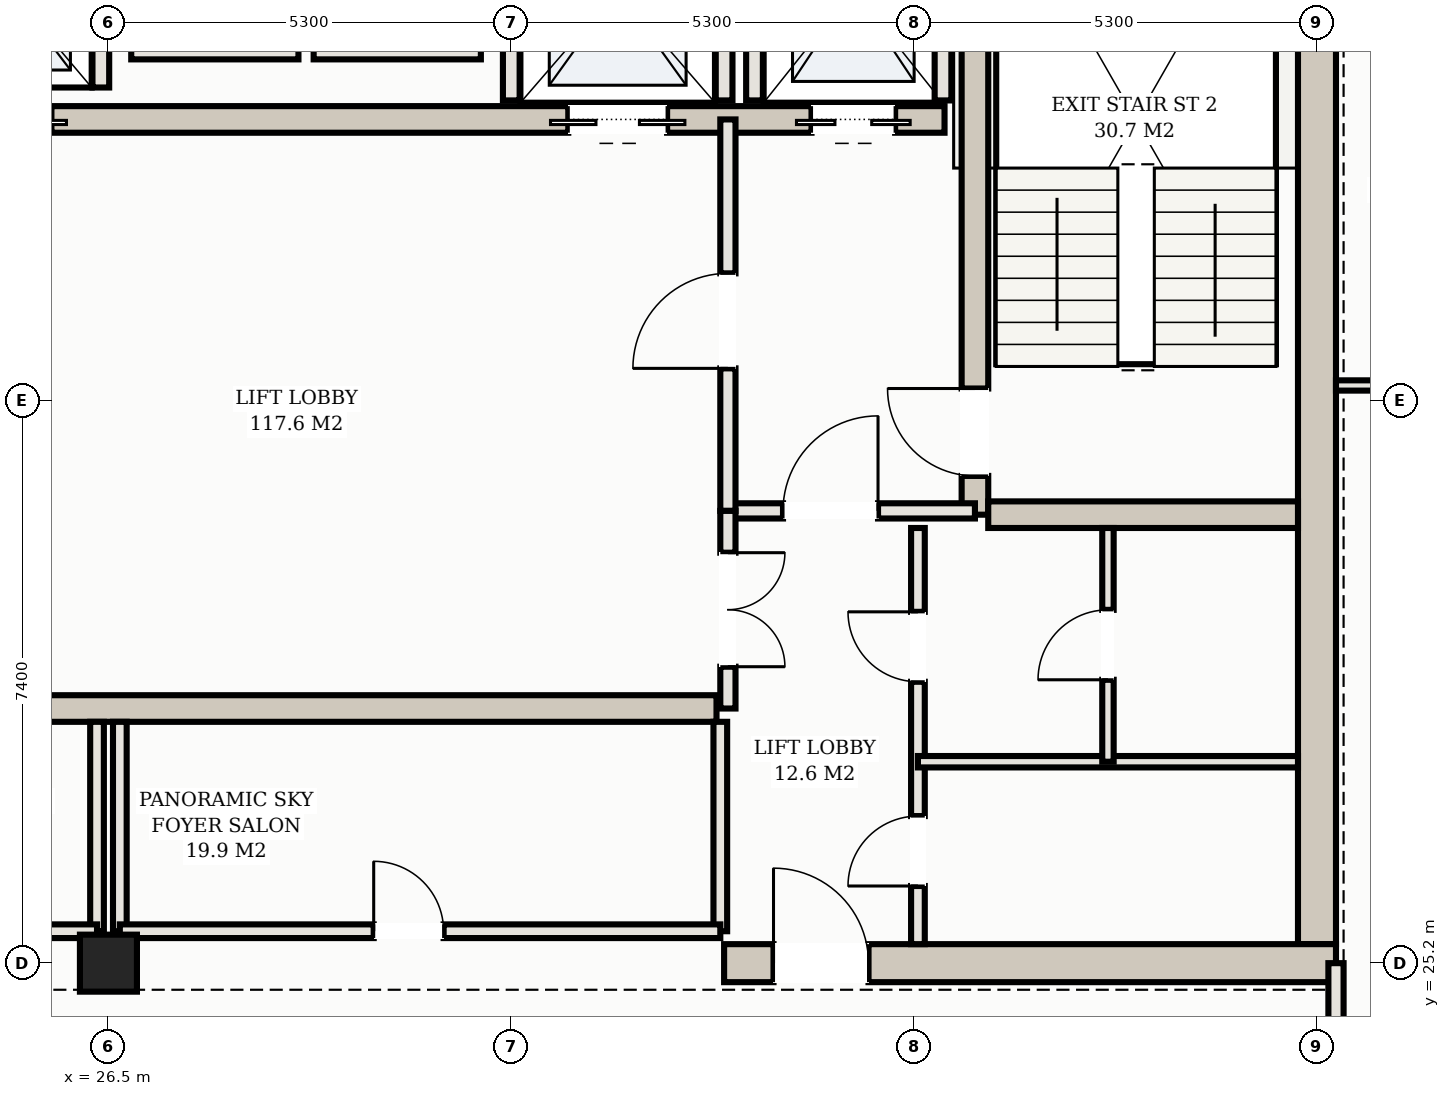
"""IFC4 building model, lengths in metres.
Left out: names, types, materials, properties, quantities, classifications, styles, units other than length and angle.
Written with IfcOpenShell. Run it as: python <this file> out.ifc"""

import sys

from ifc_helpers import new_model, si_unit, direction, frame, frame_2d, origin, origin_2d, place, context, subcontext, project, spatial, rectangle, hollow_rectangle, extrude, element, fill, save


model = new_model("IFC4")
c1 = context("Model", 3, precision=1e-05, world=origin(), true_north=direction((0.0, 1.0)))
c2 = subcontext(c1, "Body", "Model", "MODEL_VIEW")
j1 = project(units=[si_unit("LENGTHUNIT", "METRE"), si_unit("PLANEANGLEUNIT", "RADIAN")], contexts=[c1])
p1 = place(None, origin())
s1 = spatial("IfcSite", under=j1, at=p1, CompositionType="ELEMENT")
p2 = place(p1, origin())
s2 = spatial("IfcBuilding", under=s1, at=p2, CompositionType="ELEMENT")
p3 = place(p2, frame((0.0, 0.0, 226.4)))
s3 = spatial("IfcBuildingStorey", under=s2, at=p3, CompositionType="ELEMENT", Elevation=226.4)
p4 = place(p3, frame((42.4, 25.45, 0.0), z_axis=(0.0, 0.0, 1.0), x_axis=(0.0, 1.0, 0.0)))
e1 = element("IfcWall", 1, at=p4, inside=s3, PredefinedType="SHEAR", context=c2, shape_type="SweptSolid", body=[
    extrude(rectangle(XDim=14.3, YDim=0.5, at=frame_2d((7.15, 0.0))), origin(), (0.0, 0.0, 1.0), 3.11),
])
p5 = place(p3, frame((34.6, 25.2, 0.0), z_axis=(0.0, 0.0, 1.0), x_axis=(1.0, 0.0, 0.0)))
e2 = element("IfcWall", 2, at=p5, inside=s3, PredefinedType="SHEAR", context=c2, shape_type="SweptSolid", body=[
    extrude(rectangle(XDim=8.05, YDim=0.5, at=frame_2d((4.025, 0.0))), origin(), (0.0, 0.0, 1.0), 3.11),
])
p6 = place(p5, frame((0.65, 0.0, 0.0)))
e3 = element("IfcOpeningElement", 3, at=p6, cuts=e2, PredefinedType="OPENING", context=c2, shape_type="SweptSolid", body=[
    extrude(rectangle(XDim=1.25, YDim=2.2, at=frame_2d((0.625, 1.1))), frame((0.0, 0.26, 0.0), z_axis=(0.0, -1.0, 0.0), x_axis=(1.0, 0.0, 0.0)), (0.0, 0.0, 1.0), 0.52),
])
p7 = place(p3, frame((37.9, 31.1, 0.0), z_axis=(0.0, 0.0, 1.0), x_axis=(0.0, 1.0, 0.0)))
e4 = element("IfcWall", 4, at=p7, inside=s3, PredefinedType="SHEAR", context=c2, shape_type="SweptSolid", body=[
    extrude(rectangle(XDim=8.65, YDim=0.35, at=frame_2d((4.325, 0.0))), origin(), (0.0, 0.0, 1.0), 3.11),
])
p8 = place(p7, frame((0.51, 0.0, 0.0)))
e5 = element("IfcOpeningElement", 5, at=p8, cuts=e4, PredefinedType="OPENING", context=c2, shape_type="SweptSolid", body=[
    extrude(rectangle(XDim=1.15, YDim=2.2, at=frame_2d((0.575, 1.1))), frame((0.0, 0.185, 0.0), z_axis=(0.0, -1.0, 0.0), x_axis=(1.0, 0.0, 0.0)), (0.0, 0.0, 1.0), 0.37),
])
p9 = place(p3, frame((38.075, 31.1, 0.0), z_axis=(0.0, 0.0, 1.0), x_axis=(1.0, 0.0, 0.0)))
e6 = element("IfcWall", 6, at=p9, inside=s3, PredefinedType="SHEAR", context=c2, shape_type="SweptSolid", body=[
    extrude(rectangle(XDim=4.075, YDim=0.35, at=frame_2d((2.038, 0.0))), origin(), (0.0, 0.0, 1.0), 3.11),
])
p10 = place(p3, frame((15.5, 36.3, 0.0), z_axis=(0.0, 0.0, 1.0), x_axis=(1.0, 0.0, 0.0)))
e7 = element("IfcWall", 7, at=p10, inside=s3, PredefinedType="SHEAR", context=c2, shape_type="SweptSolid", body=[
    extrude(rectangle(XDim=22.0, YDim=0.35, at=frame_2d((11.0, 0.0))), origin(), (0.0, 0.0, 1.0), 3.11),
])
p11 = place(p10, frame((0.65, 0.0, 0.0)))
e8 = element("IfcOpeningElement", 8, at=p11, cuts=e7, PredefinedType="OPENING", context=c2, shape_type="SweptSolid", body=[
    extrude(rectangle(XDim=1.1, YDim=2.15, at=frame_2d((0.55, 1.075))), frame((0.0, 0.185, 0.0), z_axis=(0.0, -1.0, 0.0), x_axis=(1.0, 0.0, 0.0)), (0.0, 0.0, 1.0), 0.37),
])
p12 = place(p10, frame((20.25, 0.0, 0.0)))
e9 = element("IfcOpeningElement", 9, at=p12, cuts=e7, PredefinedType="OPENING", context=c2, shape_type="SweptSolid", body=[
    extrude(rectangle(XDim=1.1, YDim=2.15, at=frame_2d((0.55, 1.075))), frame((0.0, 0.185, 0.0), z_axis=(0.0, -1.0, 0.0), x_axis=(1.0, 0.0, 0.0)), (0.0, 0.0, 1.0), 0.37),
])
p13 = place(p10, frame((17.05, 0.0, 0.0)))
e10 = element("IfcOpeningElement", 10, at=p13, cuts=e7, PredefinedType="OPENING", context=c2, shape_type="SweptSolid", body=[
    extrude(rectangle(XDim=1.3, YDim=2.2, at=frame_2d((0.65, 1.1))), frame((0.0, 0.185, 0.0), z_axis=(0.0, -1.0, 0.0), x_axis=(1.0, 0.0, 0.0)), (0.0, 0.0, 1.0), 0.37),
])
p14 = place(p10, frame((3.95, 0.0, 0.0)))
e11 = element("IfcOpeningElement", 11, at=p14, cuts=e7, PredefinedType="OPENING", context=c2, shape_type="SweptSolid", body=[
    extrude(rectangle(XDim=1.1, YDim=2.15, at=frame_2d((0.55, 1.075))), frame((0.0, 0.185, 0.0), z_axis=(0.0, -1.0, 0.0), x_axis=(1.0, 0.0, 0.0)), (0.0, 0.0, 1.0), 0.37),
])
p15 = place(p10, frame((6.55, 0.0, 0.0)))
e12 = element("IfcOpeningElement", 12, at=p15, cuts=e7, PredefinedType="OPENING", context=c2, shape_type="SweptSolid", body=[
    extrude(rectangle(XDim=1.1, YDim=2.15, at=frame_2d((0.55, 1.075))), frame((0.0, 0.185, 0.0), z_axis=(0.0, -1.0, 0.0), x_axis=(1.0, 0.0, 0.0)), (0.0, 0.0, 1.0), 0.37),
])
p16 = place(p10, frame((9.15, 0.0, 0.0)))
e13 = element("IfcOpeningElement", 13, at=p16, cuts=e7, PredefinedType="OPENING", context=c2, shape_type="SweptSolid", body=[
    extrude(rectangle(XDim=1.1, YDim=2.15, at=frame_2d((0.55, 1.075))), frame((0.0, 0.185, 0.0), z_axis=(0.0, -1.0, 0.0), x_axis=(1.0, 0.0, 0.0)), (0.0, 0.0, 1.0), 0.37),
])
p17 = place(p3, frame((18.5, 28.55, 0.0), z_axis=(0.0, 0.0, 1.0), x_axis=(1.0, 0.0, 0.0)))
e14 = element("IfcWall", 14, at=p17, inside=s3, PredefinedType="SHEAR", context=c2, shape_type="SweptSolid", body=[
    extrude(rectangle(XDim=16.0, YDim=0.35, at=frame_2d((8.0, 0.0))), origin(), (0.0, 0.0, 1.0), 3.11),
])
p18 = place(p3, frame((26.5, 25.2, 0.0), z_axis=(0.0, 0.0, 1.0), x_axis=(1.0, 0.0, 0.0)))
e15 = element("IfcColumn", 15, at=p18, inside=s3, PredefinedType="COLUMN", context=c2, shape_type="SweptSolid", body=[
    extrude(hollow_rectangle(XDim=0.75, YDim=0.75, WallThickness=0.025, at=origin_2d()), origin(), (0.0, 0.0, 1.0), 3.3),
])
for number, where, z_axis, x_axis in (
    (16, (35.0, 36.55, 0.0), (0.0, 0.0, 1.0), (0.0, 1.0, 0.0)),
    (17, (37.48, 36.55, 0.0), (0.0, 0.0, 1.0), (0.0, 1.0, 0.0)),
    (18, (31.8, 36.55, 0.0), (0.0, 0.0, 1.0), (0.0, 1.0, 0.0)),
    (19, (34.6, 36.55, 0.0), (0.0, 0.0, 1.0), (0.0, 1.0, 0.0)),
):
    element("IfcWall", number, at=place(p3, frame(where, z_axis=z_axis, x_axis=x_axis)), inside=s3, PredefinedType="SOLIDWALL", context=c2, shape_type="SweptSolid", body=[
        extrude(rectangle(XDim=2.93, YDim=0.22, at=frame_2d((1.465, 0.0))), origin(), (0.0, 0.0, 1.0), 3.11),
    ])
p19 = place(p3, frame((26.4, 36.72, 0.0), z_axis=(0.0, 0.0, 1.0), x_axis=(0.0, 1.0, 0.0)))
e20 = element("IfcWall", 20, at=p19, inside=s3, PredefinedType="SOLIDWALL", context=c2, shape_type="SweptSolid", body=[
    extrude(rectangle(XDim=2.56, YDim=0.22, at=frame_2d((1.28, 0.0))), origin(), (0.0, 0.0, 1.0), 3.11),
])
for number, where, z_axis, x_axis in (
    (21, (26.8, 37.2, 0.0), (0.0, 0.0, 1.0), (1.0, 0.0, 0.0)),
    (22, (29.2, 37.2, 0.0), (0.0, 0.0, 1.0), (1.0, 0.0, 0.0)),
):
    element("IfcWall", number, at=place(p3, frame(where, z_axis=z_axis, x_axis=x_axis)), inside=s3, PredefinedType="SOLIDWALL", context=c2, shape_type="SweptSolid", body=[
        extrude(rectangle(XDim=2.2, YDim=0.22, at=frame_2d((1.1, 0.0))), origin(), (0.0, 0.0, 1.0), 3.11),
    ])
p20 = place(p3, frame((34.65, 31.15, 0.0), z_axis=(0.0, 0.0, 1.0), x_axis=(1.0, 0.0, 0.0)))
e23 = element("IfcWall", 23, at=p20, inside=s3, PredefinedType="PARTITIONING", context=c2, shape_type="SweptSolid", body=[
    extrude(rectangle(XDim=3.25, YDim=0.2, at=frame_2d((1.625, 0.0))), origin(), (0.0, 0.0, 1.0), 2.43),
])
p21 = place(p20, frame((0.725, 0.0, 0.0)))
e24 = element("IfcOpeningElement", 24, at=p21, cuts=e23, PredefinedType="OPENING", context=c2, shape_type="SweptSolid", body=[
    extrude(rectangle(XDim=1.25, YDim=2.2, at=frame_2d((0.625, 1.1))), frame((0.0, 0.11, 0.0), z_axis=(0.0, -1.0, 0.0), x_axis=(1.0, 0.0, 0.0)), (0.0, 0.0, 1.0), 0.22),
])
p22 = place(p3, frame((34.65, 31.15, 0.0), z_axis=(0.0, 0.0, 1.0), x_axis=(0.0, 1.0, 0.0)))
e25 = element("IfcWall", 25, at=p22, inside=s3, PredefinedType="PARTITIONING", context=c2, shape_type="SweptSolid", body=[
    extrude(rectangle(XDim=5.15, YDim=0.2, at=frame_2d((2.575, 0.0))), origin(), (0.0, 0.0, 1.0), 2.43),
])
p23 = place(p22, frame((1.875, 0.0, 0.0)))
e26 = element("IfcOpeningElement", 26, at=p23, cuts=e25, PredefinedType="OPENING", context=c2, shape_type="SweptSolid", body=[
    extrude(rectangle(XDim=1.25, YDim=2.2, at=frame_2d((0.625, 1.1))), frame((0.0, 0.11, 0.0), z_axis=(0.0, -1.0, 0.0), x_axis=(1.0, 0.0, 0.0)), (0.0, 0.0, 1.0), 0.22),
])
p24 = place(p3, frame((37.15, 25.45, 0.0), z_axis=(0.0, 0.0, 1.0), x_axis=(0.0, 1.0, 0.0)))
e27 = element("IfcWall", 27, at=p24, inside=s3, PredefinedType="PARTITIONING", context=c2, shape_type="SweptSolid", body=[
    extrude(rectangle(XDim=5.475, YDim=0.18, at=frame_2d((2.738, 0.0))), origin(), (0.0, 0.0, 1.0), 2.43),
])
p25 = place(p24, frame((0.765, 0.0, 0.0)))
e28 = element("IfcOpeningElement", 28, at=p25, cuts=e27, PredefinedType="OPENING", context=c2, shape_type="SweptSolid", body=[
    extrude(rectangle(XDim=0.92, YDim=2.15, at=frame_2d((0.46, 1.075))), frame((0.0, 0.1, 0.0), z_axis=(0.0, -1.0, 0.0), x_axis=(1.0, 0.0, 0.0)), (0.0, 0.0, 1.0), 0.2),
])
p26 = place(p24, frame((3.452, 0.0, 0.0)))
e29 = element("IfcOpeningElement", 29, at=p26, cuts=e27, PredefinedType="OPENING", context=c2, shape_type="SweptSolid", body=[
    extrude(rectangle(XDim=0.92, YDim=2.15, at=frame_2d((0.46, 1.075))), frame((0.0, 0.1, 0.0), z_axis=(0.0, -1.0, 0.0), x_axis=(1.0, 0.0, 0.0)), (0.0, 0.0, 1.0), 0.2),
])
p27 = place(p3, frame((37.15, 27.85, 0.0), z_axis=(0.0, 0.0, 1.0), x_axis=(1.0, 0.0, 0.0)))
e30 = element("IfcWall", 30, at=p27, inside=s3, PredefinedType="PARTITIONING", context=c2, shape_type="SweptSolid", body=[
    extrude(rectangle(XDim=5.0, YDim=0.15, at=frame_2d((2.5, 0.0))), origin(), (0.0, 0.0, 1.0), 2.43),
])
p28 = place(p3, frame((39.65, 27.85, 0.0), z_axis=(0.0, 0.0, 1.0), x_axis=(0.0, 1.0, 0.0)))
e31 = element("IfcWall", 31, at=p28, inside=s3, PredefinedType="PARTITIONING", context=c2, shape_type="SweptSolid", body=[
    extrude(rectangle(XDim=3.075, YDim=0.15, at=frame_2d((1.538, 0.0))), origin(), (0.0, 0.0, 1.0), 2.43),
])
p29 = place(p28, frame((1.078, 0.0, 0.0)))
e32 = element("IfcOpeningElement", 32, at=p29, cuts=e31, PredefinedType="OPENING", context=c2, shape_type="SweptSolid", body=[
    extrude(rectangle(XDim=0.92, YDim=2.15, at=frame_2d((0.46, 1.075))), frame((0.0, 0.085, 0.0), z_axis=(0.0, -1.0, 0.0), x_axis=(1.0, 0.0, 0.0)), (0.0, 0.0, 1.0), 0.17),
])
p30 = place(p3, frame((34.65, 28.55, 0.0), z_axis=(0.0, 0.0, 1.0), x_axis=(0.0, 1.0, 0.0)))
e33 = element("IfcWall", 33, at=p30, inside=s3, PredefinedType="PARTITIONING", context=c2, shape_type="SweptSolid", body=[
    extrude(rectangle(XDim=2.6, YDim=0.2, at=frame_2d((1.3, 0.0))), origin(), (0.0, 0.0, 1.0), 2.43),
])
p31 = place(p30, frame((0.55, 0.0, 0.0)))
e34 = element("IfcOpeningElement", 34, at=p31, cuts=e33, PredefinedType="OPENING", context=c2, shape_type="SweptSolid", body=[
    extrude(rectangle(XDim=1.5, YDim=2.25, at=frame_2d((0.75, 1.125))), frame((0.0, 0.11, 0.0), z_axis=(0.0, -1.0, 0.0), x_axis=(1.0, 0.0, 0.0)), (0.0, 0.0, 1.0), 0.22),
])
p32 = place(p3, frame((26.35, 25.62, 0.0), z_axis=(0.0, 0.0, 1.0), x_axis=(0.0, 1.0, 0.0)))
e35 = element("IfcWall", 35, at=p32, inside=s3, PredefinedType="PARTITIONING", context=c2, shape_type="SweptSolid", body=[
    extrude(rectangle(XDim=2.755, YDim=0.18, at=frame_2d((1.377, 0.0))), origin(), (0.0, 0.0, 1.0), 2.43),
])
p33 = place(p3, frame((18.45, 25.62, 0.0), z_axis=(0.0, 0.0, 1.0), x_axis=(1.0, 0.0, 0.0)))
e36 = element("IfcWall", 36, at=p33, inside=s3, PredefinedType="PARTITIONING", context=c2, shape_type="SweptSolid", body=[
    extrude(rectangle(XDim=7.9, YDim=0.18, at=frame_2d((3.95, 0.0))), origin(), (0.0, 0.0, 1.0), 2.43),
])
p34 = place(p33, frame((3.34, 0.0, 0.0)))
e37 = element("IfcOpeningElement", 37, at=p34, cuts=e36, PredefinedType="OPENING", context=c2, shape_type="SweptSolid", body=[
    extrude(rectangle(XDim=0.92, YDim=2.15, at=frame_2d((0.46, 1.075))), frame((0.0, 0.1, 0.0), z_axis=(0.0, -1.0, 0.0), x_axis=(1.0, 0.0, 0.0)), (0.0, 0.0, 1.0), 0.2),
])
for number, where, z_axis, x_axis in (
    (38, (26.65, 25.62, 0.0), (0.0, 0.0, 1.0), (0.0, 1.0, 0.0)),
    (39, (34.55, 25.62, 0.0), (0.0, 0.0, 1.0), (0.0, 1.0, 0.0)),
):
    element("IfcWall", number, at=place(p3, frame(where, z_axis=z_axis, x_axis=x_axis)), inside=s3, PredefinedType="PARTITIONING", context=c2, shape_type="SweptSolid", body=[
        extrude(rectangle(XDim=2.755, YDim=0.18, at=frame_2d((1.377, 0.0))), origin(), (0.0, 0.0, 1.0), 2.43),
    ])
p35 = place(p3, frame((26.65, 25.62, 0.0), z_axis=(0.0, 0.0, 1.0), x_axis=(1.0, 0.0, 0.0)))
e40 = element("IfcWall", 40, at=p35, inside=s3, PredefinedType="PARTITIONING", context=c2, shape_type="SweptSolid", body=[
    extrude(rectangle(XDim=7.9, YDim=0.18, at=frame_2d((3.95, 0.0))), origin(), (0.0, 0.0, 1.0), 2.43),
])
p36 = place(p35, frame((3.34, 0.0, 0.0)))
e41 = element("IfcOpeningElement", 41, at=p36, cuts=e40, PredefinedType="OPENING", context=c2, shape_type="SweptSolid", body=[
    extrude(rectangle(XDim=0.92, YDim=2.15, at=frame_2d((0.46, 1.075))), frame((0.0, 0.1, 0.0), z_axis=(0.0, -1.0, 0.0), x_axis=(1.0, 0.0, 0.0)), (0.0, 0.0, 1.0), 0.2),
])
p37 = place(p3, frame((42.65, 23.75, 0.0), z_axis=(0.0, 0.0, 1.0), x_axis=(0.0, 1.0, 0.0)))
e42 = element("IfcWall", 42, at=p37, inside=s3, PredefinedType="PARTITIONING", context=c2, shape_type="SweptSolid", body=[
    extrude(rectangle(XDim=1.45, YDim=0.2, at=frame_2d((0.725, 0.0))), origin(), (0.0, 0.0, 1.0), 2.43),
])
p38 = place(p3, frame((42.65, 32.8, 0.0), z_axis=(0.0, 0.0, 1.0), x_axis=(1.0, 0.0, 0.0)))
e43 = element("IfcWall", 43, at=p38, inside=s3, PredefinedType="PARTITIONING", context=c2, shape_type="SweptSolid", body=[
    extrude(rectangle(XDim=3.63, YDim=0.135, at=frame_2d((1.815, 0.0))), origin(), (0.0, 0.0, 1.0), 2.43),
])
p39 = place(p38, frame((1.355, 0.0, 0.0)))
e44 = element("IfcOpeningElement", 44, at=p39, cuts=e43, PredefinedType="OPENING", context=c2, shape_type="SweptSolid", body=[
    extrude(rectangle(XDim=0.92, YDim=2.15, at=frame_2d((0.46, 1.075))), frame((0.0, 0.078, 0.0), z_axis=(0.0, -1.0, 0.0), x_axis=(1.0, 0.0, 0.0)), (0.0, 0.0, 1.0), 0.155),
])
p40 = place(p12, frame((1.1, 0.0, 0.0), z_axis=(0.0, 0.0, 1.0), x_axis=(-1.0, 0.0, 0.0)))
e45 = element("IfcDoor", 45, at=p40, inside=s3, OperationType="DOUBLE_DOOR_SLIDING", PredefinedType="DOOR", context=c2, shape_type="SweptSolid", body=[
    extrude(rectangle(XDim=1.1, YDim=2.15, at=frame_2d((0.55, 1.075))), frame((0.0, 0.025, 0.0), z_axis=(0.0, -1.0, 0.0), x_axis=(1.0, 0.0, 0.0)), (0.0, 0.0, 1.0), 0.05),
])
fill(e9, e45)
p41 = place(p13, frame((1.3, 0.0, 0.0), z_axis=(0.0, 0.0, 1.0), x_axis=(-1.0, 0.0, 0.0)))
e46 = element("IfcDoor", 46, at=p41, inside=s3, OperationType="DOUBLE_DOOR_SLIDING", PredefinedType="DOOR", context=c2, shape_type="SweptSolid", body=[
    extrude(rectangle(XDim=1.3, YDim=2.2, at=frame_2d((0.65, 1.1))), frame((0.0, 0.025, 0.0), z_axis=(0.0, -1.0, 0.0), x_axis=(1.0, 0.0, 0.0)), (0.0, 0.0, 1.0), 0.05),
])
fill(e10, e46)
p42 = place(p6, origin())
e47 = element("IfcDoor", 47, at=p42, inside=s3, OperationType="SINGLE_SWING_LEFT", PredefinedType="DOOR", context=c2, shape_type="SweptSolid", body=[
    extrude(rectangle(XDim=1.25, YDim=2.2, at=frame_2d((0.625, 1.1))), frame((0.0, 0.025, 0.0), z_axis=(0.0, -1.0, 0.0), x_axis=(1.0, 0.0, 0.0)), (0.0, 0.0, 1.0), 0.05),
])
fill(e3, e47)
p43 = place(p21, origin())
e48 = element("IfcDoor", 48, at=p43, inside=s3, OperationType="SINGLE_SWING_RIGHT", PredefinedType="DOOR", context=c2, shape_type="SweptSolid", body=[
    extrude(rectangle(XDim=1.25, YDim=2.2, at=frame_2d((0.625, 1.1))), frame((0.0, 0.025, 0.0), z_axis=(0.0, -1.0, 0.0), x_axis=(1.0, 0.0, 0.0)), (0.0, 0.0, 1.0), 0.05),
])
fill(e24, e48)
p44 = place(p23, origin())
e49 = element("IfcDoor", 49, at=p44, inside=s3, OperationType="SINGLE_SWING_LEFT", PredefinedType="DOOR", context=c2, shape_type="SweptSolid", body=[
    extrude(rectangle(XDim=1.25, YDim=2.2, at=frame_2d((0.625, 1.1))), frame((0.0, 0.025, 0.0), z_axis=(0.0, -1.0, 0.0), x_axis=(1.0, 0.0, 0.0)), (0.0, 0.0, 1.0), 0.05),
])
fill(e26, e49)
p45 = place(p8, origin())
e50 = element("IfcDoor", 50, at=p45, inside=s3, OperationType="SINGLE_SWING_RIGHT", PredefinedType="DOOR", context=c2, shape_type="SweptSolid", body=[
    extrude(rectangle(XDim=1.15, YDim=2.2, at=frame_2d((0.575, 1.1))), frame((0.0, 0.025, 0.0), z_axis=(0.0, -1.0, 0.0), x_axis=(1.0, 0.0, 0.0)), (0.0, 0.0, 1.0), 0.05),
])
fill(e5, e50)
p46 = place(p25, origin())
e51 = element("IfcDoor", 51, at=p46, inside=s3, OperationType="SINGLE_SWING_LEFT", PredefinedType="DOOR", context=c2, shape_type="SweptSolid", body=[
    extrude(rectangle(XDim=0.92, YDim=2.15, at=frame_2d((0.46, 1.075))), frame((0.0, 0.025, 0.0), z_axis=(0.0, -1.0, 0.0), x_axis=(1.0, 0.0, 0.0)), (0.0, 0.0, 1.0), 0.05),
])
fill(e28, e51)
p47 = place(p26, origin())
e52 = element("IfcDoor", 52, at=p47, inside=s3, OperationType="SINGLE_SWING_RIGHT", PredefinedType="DOOR", context=c2, shape_type="SweptSolid", body=[
    extrude(rectangle(XDim=0.92, YDim=2.15, at=frame_2d((0.46, 1.075))), frame((0.0, 0.025, 0.0), z_axis=(0.0, -1.0, 0.0), x_axis=(1.0, 0.0, 0.0)), (0.0, 0.0, 1.0), 0.05),
])
fill(e29, e52)
p48 = place(p29, origin())
e53 = element("IfcDoor", 53, at=p48, inside=s3, OperationType="SINGLE_SWING_LEFT", PredefinedType="DOOR", context=c2, shape_type="SweptSolid", body=[
    extrude(rectangle(XDim=0.92, YDim=2.15, at=frame_2d((0.46, 1.075))), frame((0.0, 0.025, 0.0), z_axis=(0.0, -1.0, 0.0), x_axis=(1.0, 0.0, 0.0)), (0.0, 0.0, 1.0), 0.05),
])
fill(e32, e53)
p49 = place(p31, frame((1.5, 0.0, 0.0), z_axis=(0.0, 0.0, 1.0), x_axis=(-1.0, 0.0, 0.0)))
e54 = element("IfcDoor", 54, at=p49, inside=s3, OperationType="DOUBLE_DOOR_SINGLE_SWING", PredefinedType="DOOR", context=c2, shape_type="SweptSolid", body=[
    extrude(rectangle(XDim=1.5, YDim=2.25, at=frame_2d((0.75, 1.125))), frame((0.0, 0.025, 0.0), z_axis=(0.0, -1.0, 0.0), x_axis=(1.0, 0.0, 0.0)), (0.0, 0.0, 1.0), 0.05),
])
fill(e34, e54)
p50 = place(p36, origin())
e55 = element("IfcDoor", 55, at=p50, inside=s3, OperationType="SINGLE_SWING_LEFT", PredefinedType="DOOR", context=c2, shape_type="SweptSolid", body=[
    extrude(rectangle(XDim=0.92, YDim=2.15, at=frame_2d((0.46, 1.075))), frame((0.0, 0.025, 0.0), z_axis=(0.0, -1.0, 0.0), x_axis=(1.0, 0.0, 0.0)), (0.0, 0.0, 1.0), 0.05),
])
fill(e41, e55)
save(model, sys.argv[1])
